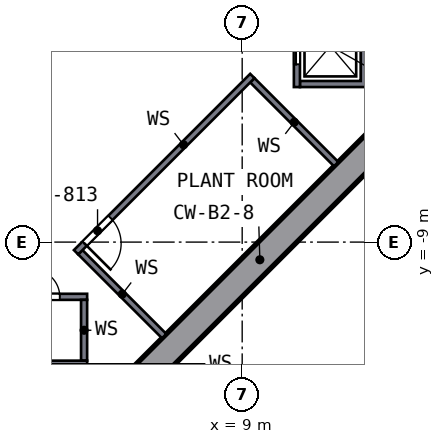
"""IFC4 building model, lengths in metres.
Left out: names, types, materials, properties, quantities, classifications, styles, units other than length and angle.
Written with IfcOpenShell. Run it as: python <this file> out.ifc"""

import sys

from ifc_helpers import new_model, si_unit, direction, frame, frame_2d, origin, place, context, subcontext, project, spatial, polyline, rectangle, outline, extrude, element, fill, save


model = new_model("IFC4")
c1 = context("Model", 3, precision=1e-05, world=origin(), true_north=direction((0.0, 1.0)))
c2 = subcontext(c1, "Body", "Model", "MODEL_VIEW")
j1 = project(units=[si_unit("LENGTHUNIT", "METRE"), si_unit("PLANEANGLEUNIT", "RADIAN")], contexts=[c1])
p1 = place(None, origin())
s1 = spatial("IfcSite", under=j1, at=p1, CompositionType="ELEMENT")
p2 = place(p1, origin())
s2 = spatial("IfcBuilding", under=s1, at=p2, CompositionType="ELEMENT")
p3 = place(p2, frame((0.0, 0.0, -7.8)))
s3 = spatial("IfcBuildingStorey", under=s2, at=p3, CompositionType="ELEMENT", Elevation=-7.8)
p4 = place(p3, frame((5.481, -13.682, 0.0), z_axis=(0.0, 0.0, 1.0), x_axis=(0.707106781, 0.707106781, 0.0)))
e1 = element("IfcWall", 1, at=p4, inside=s3, PredefinedType="SHEAR", context=c2, shape_type="SweptSolid", body=[
    extrude(rectangle(XDim=11.598, YDim=0.9, at=frame_2d((5.799, 0.0))), origin(), (0.0, 0.0, 1.0), 3.9),
])
p5 = place(p3, origin())
e2 = element("IfcWall", 2, at=p5, inside=s3, PredefinedType="SOLIDWALL", context=c2, shape_type="SweptSolid", body=[
    extrude(outline(polyline([(13.1, -3.9), (10.9, -3.9), (10.9, -3.7), (12.9, -3.7), (12.9, -1.4), (10.9, -1.4), (10.9, -1.2), (13.1, -1.2), (13.1, -3.9)])), origin(), (0.0, 0.0, 1.0), 3.45),
])
p6 = place(p3, frame((10.8, -1.2, 0.0), z_axis=(0.0, 0.0, 1.0), x_axis=(0.0, -1.0, 0.0)))
e3 = element("IfcWall", 3, at=p6, inside=s3, PredefinedType="SOLIDWALL", context=c2, shape_type="SweptSolid", body=[
    extrude(rectangle(XDim=2.7, YDim=0.2, at=frame_2d((1.35, 0.0))), origin(), (0.0, 0.0, 1.0), 3.45),
])
p7 = place(p6, frame((0.75, 0.0, 0.0)))
e4 = element("IfcOpeningElement", 4, at=p7, cuts=e3, PredefinedType="OPENING", context=c2, shape_type="SweptSolid", body=[
    extrude(rectangle(XDim=1.2, YDim=2.1, at=frame_2d((0.6, 1.05))), frame((0.0, 0.11, 0.0), z_axis=(0.0, -1.0, 0.0), x_axis=(1.0, 0.0, 0.0)), (0.0, 0.0, 1.0), 0.22),
])
p8 = place(p3, origin())
e5 = element("IfcWall", 5, at=p8, inside=s3, PredefinedType="SOLIDWALL", context=c2, shape_type="SweptSolid", body=[
    extrude(outline(polyline([(3.7, -10.9), (3.9, -10.9), (3.9, -12.9), (3.7, -12.9), (3.7, -10.9)])), origin(), (0.0, 0.0, 1.0), 3.45),
])
p9 = place(p3, origin())
e6 = element("IfcWall", 6, at=p9, inside=s3, PredefinedType="SOLIDWALL", context=c2, shape_type="SweptSolid", body=[
    extrude(outline(polyline([(1.2, -12.9), (3.9, -12.9), (3.9, -13.1), (1.2, -13.1), (1.2, -12.9)])), origin(), (0.0, 0.0, 1.0), 3.45),
])
p10 = place(p3, frame((1.2, -10.8, 0.0), z_axis=(0.0, 0.0, 1.0), x_axis=(1.0, 0.0, 0.0)))
e7 = element("IfcWall", 7, at=p10, inside=s3, PredefinedType="SOLIDWALL", context=c2, shape_type="SweptSolid", body=[
    extrude(rectangle(XDim=2.7, YDim=0.2, at=frame_2d((1.35, 0.0))), origin(), (0.0, 0.0, 1.0), 3.45),
])
p11 = place(p10, frame((0.9, 0.0, 0.0)))
e8 = element("IfcOpeningElement", 8, at=p11, cuts=e7, PredefinedType="OPENING", context=c2, shape_type="SweptSolid", body=[
    extrude(rectangle(XDim=0.9, YDim=2.1, at=frame_2d((0.45, 1.05))), frame((0.0, 0.11, 0.0), z_axis=(0.0, -1.0, 0.0), x_axis=(1.0, 0.0, 0.0)), (0.0, 0.0, 1.0), 0.22),
])
p12 = place(p3, frame((9.334, -3.535, 0.0), z_axis=(0.0, 0.0, 1.0), x_axis=(-0.707106781, -0.707106781, 0.0)))
e9 = element("IfcWall", 9, at=p12, inside=s3, PredefinedType="SOLIDWALL", context=c2, shape_type="SweptSolid", body=[
    extrude(rectangle(XDim=8.2, YDim=0.2, at=frame_2d((4.1, 0.0))), origin(), (0.0, 0.0, 1.0), 3.45),
])
p13 = place(p12, frame((6.6, 0.0, 0.0)))
e10 = element("IfcOpeningElement", 10, at=p13, cuts=e9, PredefinedType="OPENING", context=c2, shape_type="SweptSolid", body=[
    extrude(rectangle(XDim=1.2, YDim=2.1, at=frame_2d((0.6, 1.05))), frame((0.0, 0.11, 0.0), z_axis=(0.0, -1.0, 0.0), x_axis=(1.0, 0.0, 0.0)), (0.0, 0.0, 1.0), 0.22),
])
for number, where, z_axis, x_axis in (
    (11, (3.677, -9.334, 0.0), (0.0, 0.0, 1.0), (0.707, -0.707, 0.0)),
    (12, (9.334, -3.677, 0.0), (0.0, 0.0, 1.0), (0.707, -0.707, 0.0)),
):
    element("IfcWall", number, at=place(p3, frame(where, z_axis=z_axis, x_axis=x_axis)), inside=s3, PredefinedType="SOLIDWALL", context=c2, shape_type="SweptSolid", body=[
        extrude(rectangle(XDim=3.9, YDim=0.2, at=frame_2d((1.95, 0.0))), origin(), (0.0, 0.0, 1.0), 3.45),
    ])
p14 = place(p11, origin())
e13 = element("IfcDoor", 13, at=p14, inside=s3, OperationType="SINGLE_SWING_LEFT", PredefinedType="DOOR", context=c2, shape_type="SweptSolid", body=[
    extrude(rectangle(XDim=0.9, YDim=2.1, at=frame_2d((0.45, 1.05))), frame((0.0, 0.025, 0.0), z_axis=(0.0, -1.0, 0.0), x_axis=(1.0, 0.0, 0.0)), (0.0, 0.0, 1.0), 0.05),
])
fill(e8, e13)
p15 = place(p7, origin())
e14 = element("IfcDoor", 14, at=p15, inside=s3, OperationType="DOUBLE_DOOR_SLIDING", PredefinedType="DOOR", context=c2, shape_type="SweptSolid", body=[
    extrude(rectangle(XDim=1.2, YDim=2.1, at=frame_2d((0.6, 1.05))), frame((0.0, 0.025, 0.0), z_axis=(0.0, -1.0, 0.0), x_axis=(1.0, 0.0, 0.0)), (0.0, 0.0, 1.0), 0.05),
])
fill(e4, e14)
p16 = place(p13, origin())
e15 = element("IfcDoor", 15, at=p16, inside=s3, OperationType="SINGLE_SWING_RIGHT", PredefinedType="DOOR", context=c2, shape_type="SweptSolid", body=[
    extrude(rectangle(XDim=1.2, YDim=2.1, at=frame_2d((0.6, 1.05))), frame((0.0, 0.025, 0.0), z_axis=(0.0, -1.0, 0.0), x_axis=(1.0, 0.0, 0.0)), (0.0, 0.0, 1.0), 0.05),
])
fill(e10, e15)
save(model, sys.argv[1])
